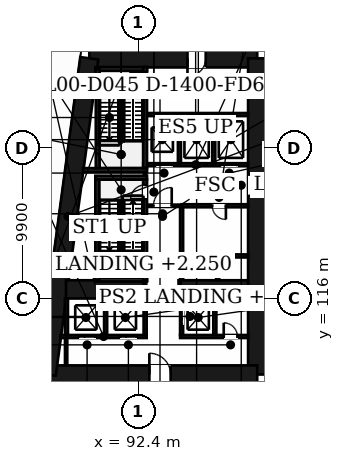
"""IFC4 building model, lengths in metres.
Left out: names, types, materials, properties, quantities, classifications, styles, units other than length and angle.
Written with IfcOpenShell. Run it as: python <this file> out.ifc"""

import sys

from ifc_helpers import new_model, si_unit, direction, frame, frame_2d, origin, place, context, subcontext, project, spatial, rectangle, extrude, element, fill, save


model = new_model("IFC4")
c1 = context("Model", 3, precision=1e-05, world=origin(), true_north=direction((0.0, 1.0)))
c2 = subcontext(c1, "Body", "Model", "MODEL_VIEW")
j1 = project(units=[si_unit("LENGTHUNIT", "METRE"), si_unit("PLANEANGLEUNIT", "RADIAN")], contexts=[c1])
p1 = place(None, origin())
s1 = spatial("IfcSite", under=j1, at=p1, CompositionType="ELEMENT")
p2 = place(p1, origin())
s2 = spatial("IfcBuilding", under=s1, at=p2, CompositionType="ELEMENT")
p3 = place(p2, origin())
s3 = spatial("IfcBuildingStorey", under=s2, at=p3, CompositionType="ELEMENT", Elevation=0.0)
p4 = place(p3, frame((89.156, 131.8, -0.35), z_axis=(0.0, 0.0, 1.0), x_axis=(1.0, 0.0, 0.0)))
e1 = element("IfcWall", 1, at=p4, inside=s3, PredefinedType="SHEAR", context=c2, shape_type="SweptSolid", body=[
    extrude(rectangle(XDim=11.044, YDim=1.2, at=frame_2d((5.522, 0.0))), origin(), (0.0, 0.0, 1.0), 9.35),
])
p5 = place(p4, frame((6.458, 0.0, 0.35)))
e2 = element("IfcOpeningElement", 2, at=p5, cuts=e1, PredefinedType="OPENING", context=c2, shape_type="SweptSolid", body=[
    extrude(rectangle(XDim=1.2, YDim=2.1, at=frame_2d((0.6, 1.05))), frame((0.0, 0.61, 0.0), z_axis=(0.0, -1.0, 0.0), x_axis=(1.0, 0.0, 0.0)), (0.0, 0.0, 1.0), 1.22),
])
p6 = place(p3, frame((100.2, 131.8, -0.35), z_axis=(0.0, 0.0, 1.0), x_axis=(0.0, -1.0, 0.0)))
e3 = element("IfcWall", 3, at=p6, inside=s3, PredefinedType="SHEAR", context=c2, shape_type="SweptSolid", body=[
    extrude(rectangle(XDim=20.8, YDim=1.2, at=frame_2d((10.4, 0.0))), origin(), (0.0, 0.0, 1.0), 9.35),
])
p7 = place(p6, frame((7.65, 0.0, 0.35)))
e4 = element("IfcOpeningElement", 4, at=p7, cuts=e3, PredefinedType="OPENING", context=c2, shape_type="SweptSolid", body=[
    extrude(rectangle(XDim=1.4, YDim=2.1, at=frame_2d((0.7, 1.05))), frame((0.0, 0.61, 0.0), z_axis=(0.0, -1.0, 0.0), x_axis=(1.0, 0.0, 0.0)), (0.0, 0.0, 1.0), 1.22),
])
p8 = place(p3, frame((100.2, 111.0, -0.35), z_axis=(0.0, 0.0, 1.0), x_axis=(-1.0, 0.0, 0.0)))
e5 = element("IfcWall", 5, at=p8, inside=s3, PredefinedType="SHEAR", context=c2, shape_type="SweptSolid", body=[
    extrude(rectangle(XDim=13.844, YDim=1.2, at=frame_2d((6.922, 0.0))), origin(), (0.0, 0.0, 1.0), 9.35),
])
p9 = place(p8, frame((5.694, 0.0, 0.35)))
e6 = element("IfcOpeningElement", 6, at=p9, cuts=e5, PredefinedType="OPENING", context=c2, shape_type="SweptSolid", body=[
    extrude(rectangle(XDim=1.4, YDim=2.1, at=frame_2d((0.7, 1.05))), frame((0.0, 0.61, 0.0), z_axis=(0.0, -1.0, 0.0), x_axis=(1.0, 0.0, 0.0)), (0.0, 0.0, 1.0), 1.22),
])
p10 = place(p3, frame((86.355, 111.0, -0.35), z_axis=(0.0, 0.0, 1.0), x_axis=(0.133413989637, 0.99106039542, 0.0)))
e7 = element("IfcWall", 7, at=p10, inside=s3, PredefinedType="SHEAR", context=c2, shape_type="SweptSolid", body=[
    extrude(rectangle(XDim=20.988, YDim=1.2, at=frame_2d((10.494, 0.0))), origin(), (0.0, 0.0, 1.0), 9.35),
])
p11 = place(p3, frame((87.623, 116.6, -0.35), z_axis=(0.0, 0.0, 1.0), x_axis=(1.0, 0.0, 0.0)))
e8 = element("IfcWall", 8, at=p11, inside=s3, PredefinedType="SHEAR", context=c2, shape_type="SweptSolid", body=[
    extrude(rectangle(XDim=5.077, YDim=1.2, at=frame_2d((2.539, 0.0))), origin(), (0.0, 0.0, 1.0), 9.35),
])
p12 = place(p3, frame((95.1, 116.6, -0.35), z_axis=(0.0, 0.0, 1.0), x_axis=(1.0, 0.0, 0.0)))
e9 = element("IfcWall", 9, at=p12, inside=s3, PredefinedType="SHEAR", context=c2, shape_type="SweptSolid", body=[
    extrude(rectangle(XDim=4.5, YDim=1.2, at=frame_2d((2.25, 0.0))), origin(), (0.0, 0.0, 1.0), 9.35),
])
p13 = place(p3, frame((87.267, 113.5, 0.0), z_axis=(0.0, 0.0, 1.0), x_axis=(1.0, 0.0, 0.0)))
e10 = element("IfcWall", 10, at=p13, inside=s3, PredefinedType="PARTITIONING", context=c2, shape_type="SweptSolid", body=[
    extrude(rectangle(XDim=5.66, YDim=0.2, at=frame_2d((2.83, 0.0))), origin(), (0.0, 0.0, 1.0), 8.5),
])
p14 = place(p13, frame((1.193, 0.0, 0.0)))
e11 = element("IfcOpeningElement", 11, at=p14, cuts=e10, PredefinedType="OPENING", context=c2, shape_type="SweptSolid", body=[
    extrude(rectangle(XDim=1.1, YDim=2.1, at=frame_2d((0.55, 1.05))), frame((0.0, 0.11, 0.0), z_axis=(0.0, -1.0, 0.0), x_axis=(1.0, 0.0, 0.0)), (0.0, 0.0, 1.0), 0.22),
])
p15 = place(p13, frame((3.91, 0.0, 0.0)))
e12 = element("IfcOpeningElement", 12, at=p15, cuts=e10, PredefinedType="OPENING", context=c2, shape_type="SweptSolid", body=[
    extrude(rectangle(XDim=1.1, YDim=2.1, at=frame_2d((0.55, 1.05))), frame((0.0, 0.11, 0.0), z_axis=(0.0, -1.0, 0.0), x_axis=(1.0, 0.0, 0.0)), (0.0, 0.0, 1.0), 0.22),
])
p16 = place(p3, frame((95.127, 113.5, 0.0), z_axis=(0.0, 0.0, 1.0), x_axis=(1.0, 0.0, 0.0)))
e13 = element("IfcWall", 13, at=p16, inside=s3, PredefinedType="PARTITIONING", context=c2, shape_type="SweptSolid", body=[
    extrude(rectangle(XDim=4.473, YDim=0.2, at=frame_2d((2.237, 0.0))), origin(), (0.0, 0.0, 1.0), 8.5),
])
p17 = place(p16, frame((2.871, 0.0, 0.0)))
e14 = element("IfcOpeningElement", 14, at=p17, cuts=e13, PredefinedType="OPENING", context=c2, shape_type="SweptSolid", body=[
    extrude(rectangle(XDim=0.9, YDim=2.1, at=frame_2d((0.45, 1.05))), frame((0.0, 0.11, 0.0), z_axis=(0.0, -1.0, 0.0), x_axis=(1.0, 0.0, 0.0)), (0.0, 0.0, 1.0), 0.22),
])
p18 = place(p3, frame((89.552, 117.245, 0.0), z_axis=(0.0, 0.0, 1.0), x_axis=(1.0, 0.0, 0.0)))
e15 = element("IfcWall", 15, at=p18, inside=s3, PredefinedType="PARTITIONING", context=c2, shape_type="SweptSolid", body=[
    extrude(rectangle(XDim=3.4, YDim=0.25, at=frame_2d((1.7, 0.0))), origin(), (0.0, 0.0, 1.0), 8.5),
])
p19 = place(p3, frame((95.227, 118.8, 0.0), z_axis=(0.0, 0.0, 1.0), x_axis=(1.0, 0.0, 0.0)))
e16 = element("IfcWall", 16, at=p19, inside=s3, PredefinedType="PARTITIONING", context=c2, shape_type="SweptSolid", body=[
    extrude(rectangle(XDim=4.373, YDim=0.2, at=frame_2d((2.187, 0.0))), origin(), (0.0, 0.0, 1.0), 8.5),
])
p20 = place(p3, frame((95.227, 122.1, 0.0), z_axis=(0.0, 0.0, 1.0), x_axis=(1.0, 0.0, 0.0)))
e17 = element("IfcWall", 17, at=p20, inside=s3, PredefinedType="PARTITIONING", context=c2, shape_type="SweptSolid", body=[
    extrude(rectangle(XDim=4.373, YDim=0.2, at=frame_2d((2.187, 0.0))), origin(), (0.0, 0.0, 1.0), 8.5),
])
p21 = place(p20, frame((2.014, 0.0, 0.0)))
e18 = element("IfcOpeningElement", 18, at=p21, cuts=e17, PredefinedType="OPENING", context=c2, shape_type="SweptSolid", body=[
    extrude(rectangle(XDim=0.9, YDim=2.1, at=frame_2d((0.45, 1.05))), frame((0.0, 0.11, 0.0), z_axis=(0.0, -1.0, 0.0), x_axis=(1.0, 0.0, 0.0)), (0.0, 0.0, 1.0), 0.22),
])
p22 = place(p3, frame((92.827, 122.1, 0.0), z_axis=(0.0, 0.0, 1.0), x_axis=(1.0, 0.0, 0.0)))
e19 = element("IfcWall", 19, at=p22, inside=s3, PredefinedType="PARTITIONING", context=c2, shape_type="SweptSolid", body=[
    extrude(rectangle(XDim=2.4, YDim=0.15, at=frame_2d((1.2, 0.0))), origin(), (0.0, 0.0, 1.0), 8.5),
])
p23 = place(p22, frame((0.55, 0.0, 0.0)))
e20 = element("IfcOpeningElement", 20, at=p23, cuts=e19, PredefinedType="OPENING", context=c2, shape_type="SweptSolid", body=[
    extrude(rectangle(XDim=1.2, YDim=2.1, at=frame_2d((0.6, 1.05))), frame((0.0, 0.085, 0.0), z_axis=(0.0, -1.0, 0.0), x_axis=(1.0, 0.0, 0.0)), (0.0, 0.0, 1.0), 0.17),
])
p24 = place(p3, frame((89.552, 123.95, 0.0), z_axis=(0.0, 0.0, 1.0), x_axis=(1.0, 0.0, 0.0)))
e21 = element("IfcWall", 21, at=p24, inside=s3, PredefinedType="PARTITIONING", context=c2, shape_type="SweptSolid", body=[
    extrude(rectangle(XDim=3.4, YDim=0.25, at=frame_2d((1.7, 0.0))), origin(), (0.0, 0.0, 1.0), 8.5),
])
p25 = place(p3, frame((88.741, 124.45, 0.0), z_axis=(0.0, 0.0, 1.0), x_axis=(1.0, 0.0, 0.0)))
e22 = element("IfcWall", 22, at=p25, inside=s3, PredefinedType="PARTITIONING", context=c2, shape_type="SweptSolid", body=[
    extrude(rectangle(XDim=4.21, YDim=0.25, at=frame_2d((2.105, 0.0))), origin(), (0.0, 0.0, 1.0), 8.5),
])
p26 = place(p3, frame((92.702, 124.8, 0.0), z_axis=(0.0, 0.0, 1.0), x_axis=(1.0, 0.0, 0.0)))
e23 = element("IfcWall", 23, at=p26, inside=s3, PredefinedType="PARTITIONING", context=c2, shape_type="SweptSolid", body=[
    extrude(rectangle(XDim=6.898, YDim=0.2, at=frame_2d((3.449, 0.0))), origin(), (0.0, 0.0, 1.0), 8.5),
])
p27 = place(p26, frame((0.818, 0.0, 0.0)))
e24 = element("IfcOpeningElement", 24, at=p27, cuts=e23, PredefinedType="OPENING", context=c2, shape_type="SweptSolid", body=[
    extrude(rectangle(XDim=1.1, YDim=2.1, at=frame_2d((0.55, 1.05))), frame((0.0, 0.11, 0.0), z_axis=(0.0, -1.0, 0.0), x_axis=(1.0, 0.0, 0.0)), (0.0, 0.0, 1.0), 0.22),
])
p28 = place(p26, frame((5.105, 0.0, 0.0)))
e25 = element("IfcOpeningElement", 25, at=p28, cuts=e23, PredefinedType="OPENING", context=c2, shape_type="SweptSolid", body=[
    extrude(rectangle(XDim=1.1, YDim=2.1, at=frame_2d((0.55, 1.05))), frame((0.0, 0.11, 0.0), z_axis=(0.0, -1.0, 0.0), x_axis=(1.0, 0.0, 0.0)), (0.0, 0.0, 1.0), 0.22),
])
p29 = place(p3, frame((92.827, 128.1, 0.0), z_axis=(0.0, 0.0, 1.0), x_axis=(1.0, 0.0, 0.0)))
e26 = element("IfcWall", 26, at=p29, inside=s3, PredefinedType="PARTITIONING", context=c2, shape_type="SweptSolid", body=[
    extrude(rectangle(XDim=6.773, YDim=0.2, at=frame_2d((3.387, 0.0))), origin(), (0.0, 0.0, 1.0), 8.5),
])
p30 = place(p29, frame((2.951, 0.0, 0.0)))
e27 = element("IfcOpeningElement", 27, at=p30, cuts=e26, PredefinedType="OPENING", context=c2, shape_type="SweptSolid", body=[
    extrude(rectangle(XDim=1.1, YDim=2.1, at=frame_2d((0.55, 1.05))), frame((0.0, 0.11, 0.0), z_axis=(0.0, -1.0, 0.0), x_axis=(1.0, 0.0, 0.0)), (0.0, 0.0, 1.0), 0.22),
])
p31 = place(p3, frame((89.552, 131.101, 0.0), z_axis=(0.0, 0.0, 1.0), x_axis=(1.0, 0.0, 0.0)))
e28 = element("IfcWall", 28, at=p31, inside=s3, PredefinedType="PARTITIONING", context=c2, shape_type="SweptSolid", body=[
    extrude(rectangle(XDim=3.4, YDim=0.25, at=frame_2d((1.7, 0.0))), origin(), (0.0, 0.0, 1.0), 8.5),
])
p32 = place(p3, frame((87.653, 113.6, 0.0), z_axis=(0.0, 0.0, 1.0), x_axis=(0.0, 1.0, 0.0)))
e29 = element("IfcWall", 29, at=p32, inside=s3, PredefinedType="PARTITIONING", context=c2, shape_type="SweptSolid", body=[
    extrude(rectangle(XDim=2.4, YDim=0.2, at=frame_2d((1.2, 0.0))), origin(), (0.0, 0.0, 1.0), 8.5),
])
p33 = place(p3, frame((87.631, 111.6, 0.0), z_axis=(0.0, 0.0, 1.0), x_axis=(0.0, 1.0, 0.0)))
e30 = element("IfcWall", 30, at=p33, inside=s3, PredefinedType="PARTITIONING", context=c2, shape_type="SweptSolid", body=[
    extrude(rectangle(XDim=1.8, YDim=0.15, at=frame_2d((0.9, 0.0))), origin(), (0.0, 0.0, 1.0), 8.5),
])
p34 = place(p3, frame((89.677, 117.17, 0.0), z_axis=(0.0, 0.0, 1.0), x_axis=(0.0, 1.0, 0.0)))
e31 = element("IfcWall", 31, at=p34, inside=s3, PredefinedType="PARTITIONING", context=c2, shape_type="SweptSolid", body=[
    extrude(rectangle(XDim=6.655, YDim=0.25, at=frame_2d((3.328, 0.0))), origin(), (0.0, 0.0, 1.0), 8.5),
])
p35 = place(p3, frame((89.707, 124.575, 0.0), z_axis=(0.0, 0.0, 1.0), x_axis=(0.0, 1.0, 0.0)))
e32 = element("IfcWall", 32, at=p35, inside=s3, PredefinedType="PARTITIONING", context=c2, shape_type="SweptSolid", body=[
    extrude(rectangle(XDim=6.5, YDim=0.25, at=frame_2d((3.25, 0.0))), origin(), (0.0, 0.0, 1.0), 8.5),
])
for number, where, z_axis, x_axis in (
    (33, (90.229, 113.6, 0.0), (0.0, 0.0, 1.0), (0.0, 1.0, 0.0)),
    (34, (92.827, 113.6, 0.0), (0.0, 0.0, 1.0), (0.0, 1.0, 0.0)),
):
    element("IfcWall", number, at=place(p3, frame(where, z_axis=z_axis, x_axis=x_axis)), inside=s3, PredefinedType="PARTITIONING", context=c2, shape_type="SweptSolid", body=[
        extrude(rectangle(XDim=2.4, YDim=0.2, at=frame_2d((1.2, 0.0))), origin(), (0.0, 0.0, 1.0), 8.5),
    ])
p36 = place(p3, frame((92.827, 116.0, 0.0), z_axis=(0.0, 0.0, 1.0), x_axis=(0.0, 1.0, 0.0)))
e35 = element("IfcWall", 35, at=p36, inside=s3, PredefinedType="PARTITIONING", context=c2, shape_type="SweptSolid", body=[
    extrude(rectangle(XDim=1.075, YDim=0.15, at=frame_2d((0.538, 0.0))), origin(), (0.0, 0.0, 1.0), 8.5),
])
p37 = place(p3, frame((92.827, 124.075, 0.0), z_axis=(0.0, 0.0, 1.0), x_axis=(0.0, 1.0, 0.0)))
e36 = element("IfcWall", 36, at=p37, inside=s3, PredefinedType="PARTITIONING", context=c2, shape_type="SweptSolid", body=[
    extrude(rectangle(XDim=0.25, YDim=0.15, at=frame_2d((0.125, 0.0))), origin(), (0.0, 0.0, 1.0), 8.5),
])
p38 = place(p3, frame((92.827, 117.17, 0.0), z_axis=(0.0, 0.0, 1.0), x_axis=(0.0, 1.0, 0.0)))
e37 = element("IfcWall", 37, at=p38, inside=s3, PredefinedType="PARTITIONING", context=c2, shape_type="SweptSolid", body=[
    extrude(rectangle(XDim=6.655, YDim=0.25, at=frame_2d((3.328, 0.0))), origin(), (0.0, 0.0, 1.0), 8.5),
])
p39 = place(p38, frame((5.355, 0.0, 0.0)))
e38 = element("IfcOpeningElement", 38, at=p39, cuts=e37, PredefinedType="OPENING", context=c2, shape_type="SweptSolid", body=[
    extrude(rectangle(XDim=0.95, YDim=2.1, at=frame_2d((0.475, 1.05))), frame((0.0, 0.135, 0.0), z_axis=(0.0, -1.0, 0.0), x_axis=(1.0, 0.0, 0.0)), (0.0, 0.0, 1.0), 0.27),
])
p40 = place(p3, frame((92.827, 124.575, 0.0), z_axis=(0.0, 0.0, 1.0), x_axis=(0.0, 1.0, 0.0)))
e39 = element("IfcWall", 39, at=p40, inside=s3, PredefinedType="PARTITIONING", context=c2, shape_type="SweptSolid", body=[
    extrude(rectangle(XDim=6.655, YDim=0.25, at=frame_2d((3.328, 0.0))), origin(), (0.0, 0.0, 1.0), 8.5),
])
p41 = place(p40, frame((5.325, 0.0, 0.0)))
e40 = element("IfcOpeningElement", 40, at=p41, cuts=e39, PredefinedType="OPENING", context=c2, shape_type="SweptSolid", body=[
    extrude(rectangle(XDim=1.0, YDim=2.1, at=frame_2d((0.5, 1.05))), frame((0.0, 0.135, 0.0), z_axis=(0.0, -1.0, 0.0), x_axis=(1.0, 0.0, 0.0)), (0.0, 0.0, 1.0), 0.27),
])
p42 = place(p3, frame((95.085, 124.9, 0.0), z_axis=(0.0, 0.0, 1.0), x_axis=(0.0, 1.0, 0.0)))
e41 = element("IfcWall", 41, at=p42, inside=s3, PredefinedType="PARTITIONING", context=c2, shape_type="SweptSolid", body=[
    extrude(rectangle(XDim=3.1, YDim=0.2, at=frame_2d((1.55, 0.0))), origin(), (0.0, 0.0, 1.0), 8.5),
])
p43 = place(p3, frame((95.1, 116.0, 0.0), z_axis=(0.0, 0.0, 1.0), x_axis=(0.0, 1.0, 0.0)))
e42 = element("IfcWall", 42, at=p43, inside=s3, PredefinedType="PARTITIONING", context=c2, shape_type="SweptSolid", body=[
    extrude(rectangle(XDim=1.2, YDim=0.15, at=frame_2d((0.6, 0.0))), origin(), (0.0, 0.0, 1.0), 8.5),
])
p44 = place(p3, frame((95.227, 113.6, 0.0), z_axis=(0.0, 0.0, 1.0), x_axis=(0.0, 1.0, 0.0)))
e43 = element("IfcWall", 43, at=p44, inside=s3, PredefinedType="PARTITIONING", context=c2, shape_type="SweptSolid", body=[
    extrude(rectangle(XDim=2.4, YDim=0.2, at=frame_2d((1.2, 0.0))), origin(), (0.0, 0.0, 1.0), 8.5),
])
p45 = place(p44, frame((0.67, 0.0, 0.0)))
e44 = element("IfcOpeningElement", 44, at=p45, cuts=e43, PredefinedType="OPENING", context=c2, shape_type="SweptSolid", body=[
    extrude(rectangle(XDim=1.1, YDim=2.1, at=frame_2d((0.55, 1.05))), frame((0.0, 0.11, 0.0), z_axis=(0.0, -1.0, 0.0), x_axis=(1.0, 0.0, 0.0)), (0.0, 0.0, 1.0), 0.22),
])
p46 = place(p3, frame((95.227, 117.2, 0.0), z_axis=(0.0, 0.0, 1.0), x_axis=(0.0, 1.0, 0.0)))
e45 = element("IfcWall", 45, at=p46, inside=s3, PredefinedType="PARTITIONING", context=c2, shape_type="SweptSolid", body=[
    extrude(rectangle(XDim=4.8, YDim=0.2, at=frame_2d((2.4, 0.0))), origin(), (0.0, 0.0, 1.0), 8.5),
])
p47 = place(p46, frame((0.35, 0.0, 0.0)))
e46 = element("IfcOpeningElement", 46, at=p47, cuts=e45, PredefinedType="OPENING", context=c2, shape_type="SweptSolid", body=[
    extrude(rectangle(XDim=0.9, YDim=2.1, at=frame_2d((0.45, 1.05))), frame((0.0, 0.11, 0.0), z_axis=(0.0, -1.0, 0.0), x_axis=(1.0, 0.0, 0.0)), (0.0, 0.0, 1.0), 0.22),
])
p48 = place(p3, frame((97.342, 124.9, 0.0), z_axis=(0.0, 0.0, 1.0), x_axis=(0.0, 1.0, 0.0)))
e47 = element("IfcWall", 47, at=p48, inside=s3, PredefinedType="PARTITIONING", context=c2, shape_type="SweptSolid", body=[
    extrude(rectangle(XDim=3.1, YDim=0.2, at=frame_2d((1.55, 0.0))), origin(), (0.0, 0.0, 1.0), 8.5),
])
p49 = place(p3, frame((97.414, 113.6, 0.0), z_axis=(0.0, 0.0, 1.0), x_axis=(0.0, 1.0, 0.0)))
e48 = element("IfcWall", 48, at=p49, inside=s3, PredefinedType="PARTITIONING", context=c2, shape_type="SweptSolid", body=[
    extrude(rectangle(XDim=2.4, YDim=0.2, at=frame_2d((1.2, 0.0))), origin(), (0.0, 0.0, 1.0), 8.5),
])
p50 = place(p3, frame((97.6, 117.2, 0.0), z_axis=(0.0, 0.0, 1.0), x_axis=(0.0, 1.0, 0.0)))
e49 = element("IfcWall", 49, at=p50, inside=s3, PredefinedType="PARTITIONING", context=c2, shape_type="SweptSolid", body=[
    extrude(rectangle(XDim=1.5, YDim=0.2, at=frame_2d((0.75, 0.0))), origin(), (0.0, 0.0, 1.0), 8.5),
])
p51 = place(p23, origin())
e50 = element("IfcDoor", 50, at=p51, inside=s3, OperationType="SINGLE_SWING_RIGHT", PredefinedType="DOOR", context=c2, shape_type="SweptSolid", body=[
    extrude(rectangle(XDim=1.2, YDim=2.1, at=frame_2d((0.6, 1.05))), frame((0.0, 0.025, 0.0), z_axis=(0.0, -1.0, 0.0), x_axis=(1.0, 0.0, 0.0)), (0.0, 0.0, 1.0), 0.05),
])
fill(e20, e50)
p52 = place(p27, origin())
e51 = element("IfcDoor", 51, at=p52, inside=s3, OperationType="SLIDING_TO_LEFT", PredefinedType="DOOR", context=c2, shape_type="SweptSolid", body=[
    extrude(rectangle(XDim=1.1, YDim=2.1, at=frame_2d((0.55, 1.05))), frame((0.0, 0.025, 0.0), z_axis=(0.0, -1.0, 0.0), x_axis=(1.0, 0.0, 0.0)), (0.0, 0.0, 1.0), 0.05),
])
fill(e24, e51)
p53 = place(p30, origin())
e52 = element("IfcDoor", 52, at=p53, inside=s3, OperationType="SLIDING_TO_LEFT", PredefinedType="DOOR", context=c2, shape_type="SweptSolid", body=[
    extrude(rectangle(XDim=1.1, YDim=2.1, at=frame_2d((0.55, 1.05))), frame((0.0, 0.025, 0.0), z_axis=(0.0, -1.0, 0.0), x_axis=(1.0, 0.0, 0.0)), (0.0, 0.0, 1.0), 0.05),
])
fill(e27, e52)
p54 = place(p28, origin())
e53 = element("IfcDoor", 53, at=p54, inside=s3, OperationType="SLIDING_TO_LEFT", PredefinedType="DOOR", context=c2, shape_type="SweptSolid", body=[
    extrude(rectangle(XDim=1.1, YDim=2.1, at=frame_2d((0.55, 1.05))), frame((0.0, 0.025, 0.0), z_axis=(0.0, -1.0, 0.0), x_axis=(1.0, 0.0, 0.0)), (0.0, 0.0, 1.0), 0.05),
])
fill(e25, e53)
p55 = place(p21, origin())
e54 = element("IfcDoor", 54, at=p55, inside=s3, OperationType="SINGLE_SWING_RIGHT", PredefinedType="DOOR", context=c2, shape_type="SweptSolid", body=[
    extrude(rectangle(XDim=0.9, YDim=2.1, at=frame_2d((0.45, 1.05))), frame((0.0, 0.025, 0.0), z_axis=(0.0, -1.0, 0.0), x_axis=(1.0, 0.0, 0.0)), (0.0, 0.0, 1.0), 0.05),
])
fill(e18, e54)
p56 = place(p39, origin())
e55 = element("IfcDoor", 55, at=p56, inside=s3, OperationType="SINGLE_SWING_LEFT", PredefinedType="DOOR", context=c2, shape_type="SweptSolid", body=[
    extrude(rectangle(XDim=0.95, YDim=2.1, at=frame_2d((0.475, 1.05))), frame((0.0, 0.025, 0.0), z_axis=(0.0, -1.0, 0.0), x_axis=(1.0, 0.0, 0.0)), (0.0, 0.0, 1.0), 0.05),
])
fill(e38, e55)
p57 = place(p41, origin())
e56 = element("IfcDoor", 56, at=p57, inside=s3, OperationType="SINGLE_SWING_RIGHT", PredefinedType="DOOR", context=c2, shape_type="SweptSolid", body=[
    extrude(rectangle(XDim=1.0, YDim=2.1, at=frame_2d((0.5, 1.05))), frame((0.0, 0.025, 0.0), z_axis=(0.0, -1.0, 0.0), x_axis=(1.0, 0.0, 0.0)), (0.0, 0.0, 1.0), 0.05),
])
fill(e40, e56)
p58 = place(p47, origin())
e57 = element("IfcDoor", 57, at=p58, inside=s3, OperationType="SINGLE_SWING_LEFT", PredefinedType="DOOR", context=c2, shape_type="SweptSolid", body=[
    extrude(rectangle(XDim=0.9, YDim=2.1, at=frame_2d((0.45, 1.05))), frame((0.0, 0.025, 0.0), z_axis=(0.0, -1.0, 0.0), x_axis=(1.0, 0.0, 0.0)), (0.0, 0.0, 1.0), 0.05),
])
fill(e46, e57)
p59 = place(p14, origin())
e58 = element("IfcDoor", 58, at=p59, inside=s3, OperationType="SLIDING_TO_LEFT", PredefinedType="DOOR", context=c2, shape_type="SweptSolid", body=[
    extrude(rectangle(XDim=1.1, YDim=2.1, at=frame_2d((0.55, 1.05))), frame((0.0, 0.025, 0.0), z_axis=(0.0, -1.0, 0.0), x_axis=(1.0, 0.0, 0.0)), (0.0, 0.0, 1.0), 0.05),
])
fill(e11, e58)
p60 = place(p15, origin())
e59 = element("IfcDoor", 59, at=p60, inside=s3, OperationType="SLIDING_TO_LEFT", PredefinedType="DOOR", context=c2, shape_type="SweptSolid", body=[
    extrude(rectangle(XDim=1.1, YDim=2.1, at=frame_2d((0.55, 1.05))), frame((0.0, 0.025, 0.0), z_axis=(0.0, -1.0, 0.0), x_axis=(1.0, 0.0, 0.0)), (0.0, 0.0, 1.0), 0.05),
])
fill(e12, e59)
p61 = place(p45, origin())
e60 = element("IfcDoor", 60, at=p61, inside=s3, OperationType="SLIDING_TO_LEFT", PredefinedType="DOOR", context=c2, shape_type="SweptSolid", body=[
    extrude(rectangle(XDim=1.1, YDim=2.1, at=frame_2d((0.55, 1.05))), frame((0.0, 0.025, 0.0), z_axis=(0.0, -1.0, 0.0), x_axis=(1.0, 0.0, 0.0)), (0.0, 0.0, 1.0), 0.05),
])
fill(e44, e60)
p62 = place(p17, origin())
e61 = element("IfcDoor", 61, at=p62, inside=s3, OperationType="SINGLE_SWING_LEFT", PredefinedType="DOOR", context=c2, shape_type="SweptSolid", body=[
    extrude(rectangle(XDim=0.9, YDim=2.1, at=frame_2d((0.45, 1.05))), frame((0.0, 0.025, 0.0), z_axis=(0.0, -1.0, 0.0), x_axis=(1.0, 0.0, 0.0)), (0.0, 0.0, 1.0), 0.05),
])
fill(e14, e61)
p63 = place(p9, origin())
e62 = element("IfcDoor", 62, at=p63, inside=s3, OperationType="SINGLE_SWING_RIGHT", PredefinedType="DOOR", context=c2, shape_type="SweptSolid", body=[
    extrude(rectangle(XDim=1.4, YDim=2.1, at=frame_2d((0.7, 1.05))), frame((0.0, 0.025, 0.0), z_axis=(0.0, -1.0, 0.0), x_axis=(1.0, 0.0, 0.0)), (0.0, 0.0, 1.0), 0.05),
])
fill(e6, e62)
p64 = place(p5, origin())
e63 = element("IfcDoor", 63, at=p64, inside=s3, OperationType="SINGLE_SWING_LEFT", PredefinedType="DOOR", context=c2, shape_type="SweptSolid", body=[
    extrude(rectangle(XDim=1.2, YDim=2.1, at=frame_2d((0.6, 1.05))), frame((0.0, 0.025, 0.0), z_axis=(0.0, -1.0, 0.0), x_axis=(1.0, 0.0, 0.0)), (0.0, 0.0, 1.0), 0.05),
])
fill(e2, e63)
p65 = place(p7, origin())
e64 = element("IfcDoor", 64, at=p65, inside=s3, OperationType="SINGLE_SWING_RIGHT", PredefinedType="DOOR", context=c2, shape_type="SweptSolid", body=[
    extrude(rectangle(XDim=1.4, YDim=2.1, at=frame_2d((0.7, 1.05))), frame((0.0, 0.025, 0.0), z_axis=(0.0, -1.0, 0.0), x_axis=(1.0, 0.0, 0.0)), (0.0, 0.0, 1.0), 0.05),
])
fill(e4, e64)
save(model, sys.argv[1])
